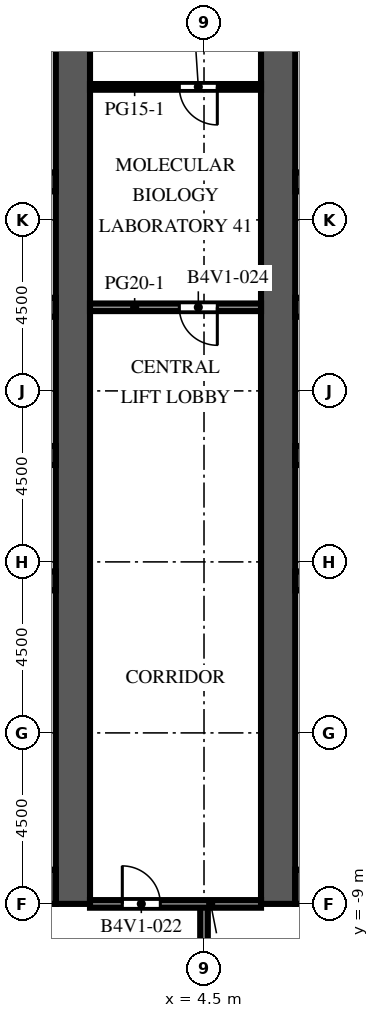
"""IFC4 building model, lengths in metres.
Left out: names, types, materials, properties, quantities, classifications, styles, units other than length and angle.
Written with IfcOpenShell. Run it as: python <this file> out.ifc"""

import sys

from ifc_helpers import new_model, si_unit, direction, frame, frame_2d, origin, place, context, subcontext, project, spatial, rectangle, extrude, element, fill, save


model = new_model("IFC4")
c1 = context("Model", 3, precision=1e-05, world=origin(), true_north=direction((0.0, 1.0)))
c2 = subcontext(c1, "Body", "Model", "MODEL_VIEW")
j1 = project(units=[si_unit("LENGTHUNIT", "METRE"), si_unit("PLANEANGLEUNIT", "RADIAN")], contexts=[c1])
p1 = place(None, origin())
s1 = spatial("IfcSite", under=j1, at=p1, CompositionType="ELEMENT")
p2 = place(p1, origin())
s2 = spatial("IfcBuilding", under=s1, at=p2, CompositionType="ELEMENT")
p3 = place(p2, frame((0.0, 0.0, 129.0)))
s3 = spatial("IfcBuildingStorey", under=s2, at=p3, CompositionType="ELEMENT", Elevation=129.0)
p4 = place(p3, frame((1.05, -9.0, 0.0), z_axis=(0.0, 0.0, 1.0), x_axis=(0.0, 1.0, 0.0)))
e1 = element("IfcWall", 1, at=p4, inside=s3, PredefinedType="SHEAR", context=c2, shape_type="SweptSolid", body=[
    extrude(rectangle(XDim=27.5, YDim=0.9, at=frame_2d((13.75, 0.0))), origin(), (0.0, 0.0, 1.0), 4.1),
])
p5 = place(p4, frame((12.55, 0.0, 0.0)))
e2 = element("IfcOpeningElement", 2, at=p5, cuts=e1, PredefinedType="OPENING", context=c2, shape_type="SweptSolid", body=[
    extrude(rectangle(XDim=2.4, YDim=2.4, at=frame_2d((1.2, 1.2))), frame((0.0, 0.46, 0.0), z_axis=(0.0, -1.0, 0.0), x_axis=(1.0, 0.0, 0.0)), (0.0, 0.0, 1.0), 0.92),
])
p6 = place(p4, frame((3.975, 0.0, 0.0)))
e3 = element("IfcOpeningElement", 3, at=p6, cuts=e1, PredefinedType="OPENING", context=c2, shape_type="SweptSolid", body=[
    extrude(rectangle(XDim=1.2, YDim=2.1, at=frame_2d((0.6, 1.05))), frame((0.0, 0.46, 0.0), z_axis=(0.0, -1.0, 0.0), x_axis=(1.0, 0.0, 0.0)), (0.0, 0.0, 1.0), 0.92),
])
p7 = place(p4, frame((22.325, 0.0, 0.0)))
e4 = element("IfcOpeningElement", 4, at=p7, cuts=e1, PredefinedType="OPENING", context=c2, shape_type="SweptSolid", body=[
    extrude(rectangle(XDim=1.2, YDim=2.1, at=frame_2d((0.6, 1.05))), frame((0.0, 0.46, 0.0), z_axis=(0.0, -1.0, 0.0), x_axis=(1.0, 0.0, 0.0)), (0.0, 0.0, 1.0), 0.92),
])
p8 = place(p3, frame((-9.6, -8.55, 0.0), z_axis=(0.0, 0.0, 1.0), x_axis=(1.0, 0.0, 0.0)))
e5 = element("IfcWall", 5, at=p8, inside=s3, PredefinedType="SHEAR", context=c2, shape_type="SweptSolid", body=[
    extrude(rectangle(XDim=10.2, YDim=0.9, at=frame_2d((5.1, 0.0))), origin(), (0.0, 0.0, 1.0), 4.1),
])
p9 = place(p3, frame((-9.6, -0.5, 0.0), z_axis=(0.0, 0.0, 1.0), x_axis=(1.0, 0.0, 0.0)))
e6 = element("IfcWall", 6, at=p9, inside=s3, PredefinedType="SHEAR", context=c2, shape_type="SweptSolid", body=[
    extrude(rectangle(XDim=10.2, YDim=0.5, at=frame_2d((5.1, 0.0))), origin(), (0.0, 0.0, 1.0), 4.1),
])
p10 = place(p3, frame((-9.6, 2.8, 0.0), z_axis=(0.0, 0.0, 1.0), x_axis=(1.0, 0.0, 0.0)))
e7 = element("IfcWall", 7, at=p10, inside=s3, PredefinedType="SHEAR", context=c2, shape_type="SweptSolid", body=[
    extrude(rectangle(XDim=10.2, YDim=0.5, at=frame_2d((5.1, 0.0))), origin(), (0.0, 0.0, 1.0), 4.1),
])
p11 = place(p10, frame((0.562, 0.0, 0.0)))
e8 = element("IfcOpeningElement", 8, at=p11, cuts=e7, PredefinedType="OPENING", context=c2, shape_type="SweptSolid", body=[
    extrude(rectangle(XDim=1.1, YDim=2.1, at=frame_2d((0.55, 1.05))), frame((0.0, 0.26, 0.0), z_axis=(0.0, -1.0, 0.0), x_axis=(1.0, 0.0, 0.0)), (0.0, 0.0, 1.0), 0.52),
])
p12 = place(p10, frame((3.238, 0.0, 0.0)))
e9 = element("IfcOpeningElement", 9, at=p12, cuts=e7, PredefinedType="OPENING", context=c2, shape_type="SweptSolid", body=[
    extrude(rectangle(XDim=1.1, YDim=2.1, at=frame_2d((0.55, 1.05))), frame((0.0, 0.26, 0.0), z_axis=(0.0, -1.0, 0.0), x_axis=(1.0, 0.0, 0.0)), (0.0, 0.0, 1.0), 0.52),
])
p13 = place(p10, frame((8.538, 0.0, 0.0)))
e10 = element("IfcOpeningElement", 10, at=p13, cuts=e7, PredefinedType="OPENING", context=c2, shape_type="SweptSolid", body=[
    extrude(rectangle(XDim=1.1, YDim=2.1, at=frame_2d((0.55, 1.05))), frame((0.0, 0.26, 0.0), z_axis=(0.0, -1.0, 0.0), x_axis=(1.0, 0.0, 0.0)), (0.0, 0.0, 1.0), 0.52),
])
p14 = place(p3, frame((-9.6, 6.7, 0.0), z_axis=(0.0, 0.0, 1.0), x_axis=(1.0, 0.0, 0.0)))
e11 = element("IfcWall", 11, at=p14, inside=s3, PredefinedType="SHEAR", context=c2, shape_type="SweptSolid", body=[
    extrude(rectangle(XDim=10.2, YDim=0.5, at=frame_2d((5.1, 0.0))), origin(), (0.0, 0.0, 1.0), 4.1),
])
p15 = place(p14, frame((0.562, 0.0, 0.0)))
e12 = element("IfcOpeningElement", 12, at=p15, cuts=e11, PredefinedType="OPENING", context=c2, shape_type="SweptSolid", body=[
    extrude(rectangle(XDim=1.1, YDim=2.1, at=frame_2d((0.55, 1.05))), frame((0.0, 0.26, 0.0), z_axis=(0.0, -1.0, 0.0), x_axis=(1.0, 0.0, 0.0)), (0.0, 0.0, 1.0), 0.52),
])
p16 = place(p14, frame((3.288, 0.0, 0.0)))
e13 = element("IfcOpeningElement", 13, at=p16, cuts=e11, PredefinedType="OPENING", context=c2, shape_type="SweptSolid", body=[
    extrude(rectangle(XDim=1.0, YDim=2.1, at=frame_2d((0.5, 1.05))), frame((0.0, 0.26, 0.0), z_axis=(0.0, -1.0, 0.0), x_axis=(1.0, 0.0, 0.0)), (0.0, 0.0, 1.0), 0.52),
])
p17 = place(p14, frame((5.913, 0.0, 0.0)))
e14 = element("IfcOpeningElement", 14, at=p17, cuts=e11, PredefinedType="OPENING", context=c2, shape_type="SweptSolid", body=[
    extrude(rectangle(XDim=1.0, YDim=2.1, at=frame_2d((0.5, 1.05))), frame((0.0, 0.26, 0.0), z_axis=(0.0, -1.0, 0.0), x_axis=(1.0, 0.0, 0.0)), (0.0, 0.0, 1.0), 0.52),
])
p18 = place(p14, frame((8.587, 0.0, 0.0)))
e15 = element("IfcOpeningElement", 15, at=p18, cuts=e11, PredefinedType="OPENING", context=c2, shape_type="SweptSolid", body=[
    extrude(rectangle(XDim=1.0, YDim=2.1, at=frame_2d((0.5, 1.05))), frame((0.0, 0.26, 0.0), z_axis=(0.0, -1.0, 0.0), x_axis=(1.0, 0.0, 0.0)), (0.0, 0.0, 1.0), 0.52),
])
p19 = place(p3, frame((-9.6, 10.0, 0.0), z_axis=(0.0, 0.0, 1.0), x_axis=(1.0, 0.0, 0.0)))
e16 = element("IfcWall", 16, at=p19, inside=s3, PredefinedType="SHEAR", context=c2, shape_type="SweptSolid", body=[
    extrude(rectangle(XDim=10.2, YDim=0.5, at=frame_2d((5.1, 0.0))), origin(), (0.0, 0.0, 1.0), 4.1),
])
p20 = place(p3, frame((6.45, -9.0, 0.0), z_axis=(0.0, 0.0, 1.0), x_axis=(0.0, 1.0, 0.0)))
e17 = element("IfcWall", 17, at=p20, inside=s3, PredefinedType="SHEAR", context=c2, shape_type="SweptSolid", body=[
    extrude(rectangle(XDim=27.5, YDim=0.9, at=frame_2d((13.75, 0.0))), origin(), (0.0, 0.0, 1.0), 4.1),
])
p21 = place(p20, frame((12.55, 0.0, 0.0)))
e18 = element("IfcOpeningElement", 18, at=p21, cuts=e17, PredefinedType="OPENING", context=c2, shape_type="SweptSolid", body=[
    extrude(rectangle(XDim=2.4, YDim=2.4, at=frame_2d((1.2, 1.2))), frame((0.0, 0.46, 0.0), z_axis=(0.0, -1.0, 0.0), x_axis=(1.0, 0.0, 0.0)), (0.0, 0.0, 1.0), 0.92),
])
p22 = place(p20, frame((3.975, 0.0, 0.0)))
e19 = element("IfcOpeningElement", 19, at=p22, cuts=e17, PredefinedType="OPENING", context=c2, shape_type="SweptSolid", body=[
    extrude(rectangle(XDim=1.2, YDim=2.1, at=frame_2d((0.6, 1.05))), frame((0.0, 0.46, 0.0), z_axis=(0.0, -1.0, 0.0), x_axis=(1.0, 0.0, 0.0)), (0.0, 0.0, 1.0), 0.92),
])
p23 = place(p20, frame((22.325, 0.0, 0.0)))
e20 = element("IfcOpeningElement", 20, at=p23, cuts=e17, PredefinedType="OPENING", context=c2, shape_type="SweptSolid", body=[
    extrude(rectangle(XDim=1.2, YDim=2.1, at=frame_2d((0.6, 1.05))), frame((0.0, 0.46, 0.0), z_axis=(0.0, -1.0, 0.0), x_axis=(1.0, 0.0, 0.0)), (0.0, 0.0, 1.0), 0.92),
])
p24 = place(p3, frame((6.9, -8.55, 0.0), z_axis=(0.0, 0.0, 1.0), x_axis=(1.0, 0.0, 0.0)))
e21 = element("IfcWall", 21, at=p24, inside=s3, PredefinedType="SHEAR", context=c2, shape_type="SweptSolid", body=[
    extrude(rectangle(XDim=10.2, YDim=0.9, at=frame_2d((5.1, 0.0))), origin(), (0.0, 0.0, 1.0), 4.1),
])
p25 = place(p3, frame((6.9, -0.5, 0.0), z_axis=(0.0, 0.0, 1.0), x_axis=(1.0, 0.0, 0.0)))
e22 = element("IfcWall", 22, at=p25, inside=s3, PredefinedType="SHEAR", context=c2, shape_type="SweptSolid", body=[
    extrude(rectangle(XDim=10.2, YDim=0.5, at=frame_2d((5.1, 0.0))), origin(), (0.0, 0.0, 1.0), 4.1),
])
p26 = place(p3, frame((6.9, 2.8, 0.0), z_axis=(0.0, 0.0, 1.0), x_axis=(1.0, 0.0, 0.0)))
e23 = element("IfcWall", 23, at=p26, inside=s3, PredefinedType="SHEAR", context=c2, shape_type="SweptSolid", body=[
    extrude(rectangle(XDim=10.2, YDim=0.5, at=frame_2d((5.1, 0.0))), origin(), (0.0, 0.0, 1.0), 4.1),
])
p27 = place(p26, frame((0.562, 0.0, 0.0)))
e24 = element("IfcOpeningElement", 24, at=p27, cuts=e23, PredefinedType="OPENING", context=c2, shape_type="SweptSolid", body=[
    extrude(rectangle(XDim=1.1, YDim=2.1, at=frame_2d((0.55, 1.05))), frame((0.0, 0.26, 0.0), z_axis=(0.0, -1.0, 0.0), x_axis=(1.0, 0.0, 0.0)), (0.0, 0.0, 1.0), 0.52),
])
p28 = place(p26, frame((3.238, 0.0, 0.0)))
e25 = element("IfcOpeningElement", 25, at=p28, cuts=e23, PredefinedType="OPENING", context=c2, shape_type="SweptSolid", body=[
    extrude(rectangle(XDim=1.1, YDim=2.1, at=frame_2d((0.55, 1.05))), frame((0.0, 0.26, 0.0), z_axis=(0.0, -1.0, 0.0), x_axis=(1.0, 0.0, 0.0)), (0.0, 0.0, 1.0), 0.52),
])
p29 = place(p26, frame((8.538, 0.0, 0.0)))
e26 = element("IfcOpeningElement", 26, at=p29, cuts=e23, PredefinedType="OPENING", context=c2, shape_type="SweptSolid", body=[
    extrude(rectangle(XDim=1.1, YDim=2.1, at=frame_2d((0.55, 1.05))), frame((0.0, 0.26, 0.0), z_axis=(0.0, -1.0, 0.0), x_axis=(1.0, 0.0, 0.0)), (0.0, 0.0, 1.0), 0.52),
])
p30 = place(p3, frame((6.9, 6.7, 0.0), z_axis=(0.0, 0.0, 1.0), x_axis=(1.0, 0.0, 0.0)))
e27 = element("IfcWall", 27, at=p30, inside=s3, PredefinedType="SHEAR", context=c2, shape_type="SweptSolid", body=[
    extrude(rectangle(XDim=10.2, YDim=0.5, at=frame_2d((5.1, 0.0))), origin(), (0.0, 0.0, 1.0), 4.1),
])
p31 = place(p30, frame((0.562, 0.0, 0.0)))
e28 = element("IfcOpeningElement", 28, at=p31, cuts=e27, PredefinedType="OPENING", context=c2, shape_type="SweptSolid", body=[
    extrude(rectangle(XDim=1.1, YDim=2.1, at=frame_2d((0.55, 1.05))), frame((0.0, 0.26, 0.0), z_axis=(0.0, -1.0, 0.0), x_axis=(1.0, 0.0, 0.0)), (0.0, 0.0, 1.0), 0.52),
])
p32 = place(p30, frame((3.288, 0.0, 0.0)))
e29 = element("IfcOpeningElement", 29, at=p32, cuts=e27, PredefinedType="OPENING", context=c2, shape_type="SweptSolid", body=[
    extrude(rectangle(XDim=1.0, YDim=2.1, at=frame_2d((0.5, 1.05))), frame((0.0, 0.26, 0.0), z_axis=(0.0, -1.0, 0.0), x_axis=(1.0, 0.0, 0.0)), (0.0, 0.0, 1.0), 0.52),
])
p33 = place(p30, frame((5.913, 0.0, 0.0)))
e30 = element("IfcOpeningElement", 30, at=p33, cuts=e27, PredefinedType="OPENING", context=c2, shape_type="SweptSolid", body=[
    extrude(rectangle(XDim=1.0, YDim=2.1, at=frame_2d((0.5, 1.05))), frame((0.0, 0.26, 0.0), z_axis=(0.0, -1.0, 0.0), x_axis=(1.0, 0.0, 0.0)), (0.0, 0.0, 1.0), 0.52),
])
p34 = place(p30, frame((8.587, 0.0, 0.0)))
e31 = element("IfcOpeningElement", 31, at=p34, cuts=e27, PredefinedType="OPENING", context=c2, shape_type="SweptSolid", body=[
    extrude(rectangle(XDim=1.0, YDim=2.1, at=frame_2d((0.5, 1.05))), frame((0.0, 0.26, 0.0), z_axis=(0.0, -1.0, 0.0), x_axis=(1.0, 0.0, 0.0)), (0.0, 0.0, 1.0), 0.52),
])
p35 = place(p3, frame((6.9, 10.0, 0.0), z_axis=(0.0, 0.0, 1.0), x_axis=(1.0, 0.0, 0.0)))
e32 = element("IfcWall", 32, at=p35, inside=s3, PredefinedType="SHEAR", context=c2, shape_type="SweptSolid", body=[
    extrude(rectangle(XDim=10.2, YDim=0.5, at=frame_2d((5.1, 0.0))), origin(), (0.0, 0.0, 1.0), 4.1),
])
p36 = place(p3, frame((4.5, -21.9, 0.0), z_axis=(0.0, 0.0, 1.0), x_axis=(0.0, 1.0, 0.0)))
e33 = element("IfcWall", 33, at=p36, inside=s3, PredefinedType="PARTITIONING", context=c2, shape_type="SweptSolid", body=[
    extrude(rectangle(XDim=12.9, YDim=0.2, at=frame_2d((6.45, 0.0))), origin(), (0.0, 0.0, 1.0), 3.65),
])
p37 = place(p3, frame((6.0, -9.0, 0.0), z_axis=(0.0, 0.0, 1.0), x_axis=(-1.0, 0.0, 0.0)))
e34 = element("IfcWall", 34, at=p37, inside=s3, PredefinedType="PARTITIONING", context=c2, shape_type="SweptSolid", body=[
    extrude(rectangle(XDim=4.5, YDim=0.2, at=frame_2d((2.25, 0.0))), origin(), (0.0, 0.0, 1.0), 3.65),
])
p38 = place(p37, frame((2.65, 0.0, 0.0)))
e35 = element("IfcOpeningElement", 35, at=p38, cuts=e34, PredefinedType="OPENING", context=c2, shape_type="SweptSolid", body=[
    extrude(rectangle(XDim=1.0, YDim=2.1, at=frame_2d((0.5, 1.05))), frame((0.0, 0.11, 0.0), z_axis=(0.0, -1.0, 0.0), x_axis=(1.0, 0.0, 0.0)), (0.0, 0.0, 1.0), 0.22),
])
p39 = place(p3, frame((1.5, 6.7, 0.0), z_axis=(0.0, 0.0, 1.0), x_axis=(1.0, 0.0, 0.0)))
e36 = element("IfcWall", 36, at=p39, inside=s3, PredefinedType="PARTITIONING", context=c2, shape_type="SweptSolid", body=[
    extrude(rectangle(XDim=4.5, YDim=0.2, at=frame_2d((2.25, 0.0))), origin(), (0.0, 0.0, 1.0), 3.65),
])
p40 = place(p39, frame((2.35, 0.0, 0.0)))
e37 = element("IfcOpeningElement", 37, at=p40, cuts=e36, PredefinedType="OPENING", context=c2, shape_type="SweptSolid", body=[
    extrude(rectangle(XDim=1.0, YDim=2.1, at=frame_2d((0.5, 1.05))), frame((0.0, 0.11, 0.0), z_axis=(0.0, -1.0, 0.0), x_axis=(1.0, 0.0, 0.0)), (0.0, 0.0, 1.0), 0.22),
])
p41 = place(p3, frame((1.5, 12.5, 0.0), z_axis=(0.0, 0.0, 1.0), x_axis=(1.0, 0.0, 0.0)))
e38 = element("IfcWall", 38, at=p41, inside=s3, PredefinedType="PARTITIONING", context=c2, shape_type="SweptSolid", body=[
    extrude(rectangle(XDim=4.5, YDim=0.15, at=frame_2d((2.25, 0.0))), origin(), (0.0, 0.0, 1.0), 3.65),
])
p42 = place(p41, frame((2.35, 0.0, 0.0)))
e39 = element("IfcOpeningElement", 39, at=p42, cuts=e38, PredefinedType="OPENING", context=c2, shape_type="SweptSolid", body=[
    extrude(rectangle(XDim=1.0, YDim=2.1, at=frame_2d((0.5, 1.05))), frame((0.0, 0.085, 0.0), z_axis=(0.0, -1.0, 0.0), x_axis=(1.0, 0.0, 0.0)), (0.0, 0.0, 1.0), 0.17),
])
p43 = place(p5, origin())
e40 = element("IfcDoor", 40, at=p43, inside=s3, OperationType="DOUBLE_DOOR_DOUBLE_SWING", PredefinedType="DOOR", context=c2, shape_type="SweptSolid", body=[
    extrude(rectangle(XDim=2.4, YDim=2.4, at=frame_2d((1.2, 1.2))), frame((0.0, 0.025, 0.0), z_axis=(0.0, -1.0, 0.0), x_axis=(1.0, 0.0, 0.0)), (0.0, 0.0, 1.0), 0.05),
])
fill(e2, e40)
p44 = place(p21, origin())
e41 = element("IfcDoor", 41, at=p44, inside=s3, OperationType="DOUBLE_DOOR_DOUBLE_SWING", PredefinedType="DOOR", context=c2, shape_type="SweptSolid", body=[
    extrude(rectangle(XDim=2.4, YDim=2.4, at=frame_2d((1.2, 1.2))), frame((0.0, 0.025, 0.0), z_axis=(0.0, -1.0, 0.0), x_axis=(1.0, 0.0, 0.0)), (0.0, 0.0, 1.0), 0.05),
])
fill(e18, e41)
p45 = place(p6, origin())
e42 = element("IfcDoor", 42, at=p45, inside=s3, OperationType="SINGLE_SWING_LEFT", PredefinedType="DOOR", context=c2, shape_type="SweptSolid", body=[
    extrude(rectangle(XDim=1.2, YDim=2.1, at=frame_2d((0.6, 1.05))), frame((0.0, 0.425, 0.0), z_axis=(0.0, -1.0, 0.0), x_axis=(1.0, 0.0, 0.0)), (0.0, 0.0, 1.0), 0.05),
])
fill(e3, e42)
p46 = place(p7, origin())
e43 = element("IfcDoor", 43, at=p46, inside=s3, OperationType="SINGLE_SWING_LEFT", PredefinedType="DOOR", context=c2, shape_type="SweptSolid", body=[
    extrude(rectangle(XDim=1.2, YDim=2.1, at=frame_2d((0.6, 1.05))), frame((0.0, 0.425, 0.0), z_axis=(0.0, -1.0, 0.0), x_axis=(1.0, 0.0, 0.0)), (0.0, 0.0, 1.0), 0.05),
])
fill(e4, e43)
p47 = place(p22, origin())
e44 = element("IfcDoor", 44, at=p47, inside=s3, OperationType="SINGLE_SWING_RIGHT", PredefinedType="DOOR", context=c2, shape_type="SweptSolid", body=[
    extrude(rectangle(XDim=1.2, YDim=2.1, at=frame_2d((0.6, 1.05))), frame((0.0, -0.375, 0.0), z_axis=(0.0, -1.0, 0.0), x_axis=(1.0, 0.0, 0.0)), (0.0, 0.0, 1.0), 0.05),
])
fill(e19, e44)
p48 = place(p23, origin())
e45 = element("IfcDoor", 45, at=p48, inside=s3, OperationType="SINGLE_SWING_RIGHT", PredefinedType="DOOR", context=c2, shape_type="SweptSolid", body=[
    extrude(rectangle(XDim=1.2, YDim=2.1, at=frame_2d((0.6, 1.05))), frame((0.0, -0.375, 0.0), z_axis=(0.0, -1.0, 0.0), x_axis=(1.0, 0.0, 0.0)), (0.0, 0.0, 1.0), 0.05),
])
fill(e20, e45)
p49 = place(p38, origin())
e46 = element("IfcDoor", 46, at=p49, inside=s3, OperationType="SINGLE_SWING_RIGHT", PredefinedType="DOOR", context=c2, shape_type="SweptSolid", body=[
    extrude(rectangle(XDim=1.0, YDim=2.1, at=frame_2d((0.5, 1.05))), frame((0.0, 0.025, 0.0), z_axis=(0.0, -1.0, 0.0), x_axis=(1.0, 0.0, 0.0)), (0.0, 0.0, 1.0), 0.05),
])
fill(e35, e46)
p50 = place(p40, origin())
e47 = element("IfcDoor", 47, at=p50, inside=s3, OperationType="SINGLE_SWING_RIGHT", PredefinedType="DOOR", context=c2, shape_type="SweptSolid", body=[
    extrude(rectangle(XDim=1.0, YDim=2.1, at=frame_2d((0.5, 1.05))), frame((0.0, 0.025, 0.0), z_axis=(0.0, -1.0, 0.0), x_axis=(1.0, 0.0, 0.0)), (0.0, 0.0, 1.0), 0.05),
])
fill(e37, e47)
p51 = place(p42, origin())
e48 = element("IfcDoor", 48, at=p51, inside=s3, OperationType="SINGLE_SWING_RIGHT", PredefinedType="DOOR", context=c2, shape_type="SweptSolid", body=[
    extrude(rectangle(XDim=1.0, YDim=2.1, at=frame_2d((0.5, 1.05))), frame((0.0, 0.025, 0.0), z_axis=(0.0, -1.0, 0.0), x_axis=(1.0, 0.0, 0.0)), (0.0, 0.0, 1.0), 0.05),
])
fill(e39, e48)
save(model, sys.argv[1])
